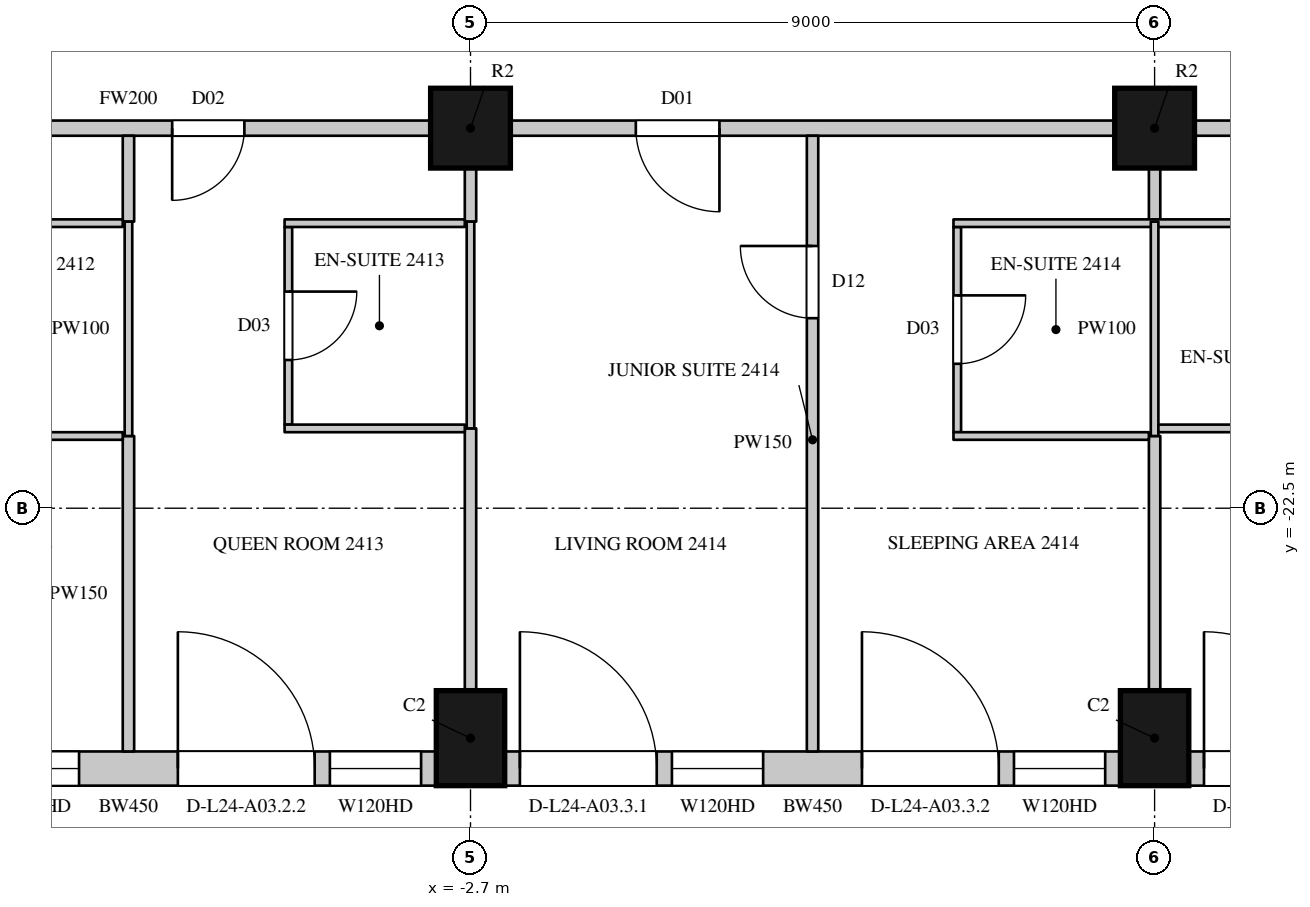
"""IFC4 building model, lengths in metres.
Left out: names, types, materials, properties, quantities, classifications, styles, units other than length and angle.
Written with IfcOpenShell. Run it as: python <this file> out.ifc"""

import sys

from ifc_helpers import new_model, si_unit, direction, frame, frame_2d, origin, origin_2d, place, context, subcontext, project, spatial, rectangle, circle, extrude, element, fill, save


model = new_model("IFC4")
c1 = context("Model", 3, precision=1e-05, world=origin(), true_north=direction((0.0, 1.0)))
c2 = subcontext(c1, "Body", "Model", "MODEL_VIEW")
j1 = project(units=[si_unit("LENGTHUNIT", "METRE"), si_unit("PLANEANGLEUNIT", "RADIAN")], contexts=[c1])
p1 = place(None, origin())
s1 = spatial("IfcSite", under=j1, at=p1, CompositionType="ELEMENT")
p2 = place(p1, origin())
s2 = spatial("IfcBuilding", under=s1, at=p2, CompositionType="ELEMENT")
p3 = place(p2, frame((0.0, 0.0, 116.7)))
s3 = spatial("IfcBuildingStorey", under=s2, at=p3, CompositionType="ELEMENT", Elevation=116.7)
for number, where, z_axis, x_axis in (
    (1, (-2.7, -25.525, 0.0), (0.0, 0.0, 1.0), (1.0, 0.0, 0.0)),
    (2, (6.3, -25.525, 0.0), (0.0, 0.0, 1.0), (1.0, 0.0, 0.0)),
):
    element("IfcColumn", number, at=place(p3, frame(where, z_axis=z_axis, x_axis=x_axis)), inside=s3, PredefinedType="COLUMN", context=c2, shape_type="SweptSolid", body=[
        extrude(rectangle(XDim=0.9, YDim=1.25, at=origin_2d()), origin(), (0.0, 0.0, 1.0), 3.6),
    ])
for number, where, z_axis, x_axis in (
    (3, (-2.7, -17.5, 0.0), (0.0, 0.0, 1.0), (1.0, 0.0, 0.0)),
    (4, (6.3, -17.5, 0.0), (0.0, 0.0, 1.0), (1.0, 0.0, 0.0)),
):
    element("IfcColumn", number, at=place(p3, frame(where, z_axis=z_axis, x_axis=x_axis)), inside=s3, PredefinedType="COLUMN", context=c2, shape_type="SweptSolid", body=[
        extrude(circle(Radius=0.525, at=origin_2d()), origin(), (0.0, 0.0, 1.0), 3.6),
    ])
p4 = place(p3, frame((-11.25, -25.925, 0.0), z_axis=(0.0, 0.0, 1.0), x_axis=(1.0, 0.0, 0.0)))
e5 = element("IfcWall", 5, at=p4, inside=s3, PredefinedType="SOLIDWALL", context=c2, shape_type="SweptSolid", body=[
    extrude(rectangle(XDim=8.1, YDim=0.45, at=frame_2d((4.05, 0.0))), origin(), (0.0, 0.0, 1.0), 3.3),
])
p5 = place(p4, frame((0.2, 0.0, 0.0)))
e6 = element("IfcOpeningElement", 6, at=p5, cuts=e5, PredefinedType="OPENING", context=c2, shape_type="SweptSolid", body=[
    extrude(rectangle(XDim=1.8, YDim=2.4, at=frame_2d((0.9, 1.2))), frame((0.0, 0.235, 0.0), z_axis=(0.0, -1.0, 0.0), x_axis=(1.0, 0.0, 0.0)), (0.0, 0.0, 1.0), 0.47),
])
p6 = place(p4, frame((2.2, 0.0, 1.05)))
e7 = element("IfcOpeningElement", 7, at=p6, cuts=e5, PredefinedType="OPENING", context=c2, shape_type="SweptSolid", body=[
    extrude(rectangle(XDim=1.2, YDim=2.0, at=frame_2d((0.6, 1.0))), frame((0.0, 0.235, 0.0), z_axis=(0.0, -1.0, 0.0), x_axis=(1.0, 0.0, 0.0)), (0.0, 0.0, 1.0), 0.47),
])
p7 = place(p4, frame((4.7, 0.0, 0.0)))
e8 = element("IfcOpeningElement", 8, at=p7, cuts=e5, PredefinedType="OPENING", context=c2, shape_type="SweptSolid", body=[
    extrude(rectangle(XDim=1.8, YDim=2.4, at=frame_2d((0.9, 1.2))), frame((0.0, 0.235, 0.0), z_axis=(0.0, -1.0, 0.0), x_axis=(1.0, 0.0, 0.0)), (0.0, 0.0, 1.0), 0.47),
])
p8 = place(p4, frame((6.7, 0.0, 1.05)))
e9 = element("IfcOpeningElement", 9, at=p8, cuts=e5, PredefinedType="OPENING", context=c2, shape_type="SweptSolid", body=[
    extrude(rectangle(XDim=1.2, YDim=2.0, at=frame_2d((0.6, 1.0))), frame((0.0, 0.235, 0.0), z_axis=(0.0, -1.0, 0.0), x_axis=(1.0, 0.0, 0.0)), (0.0, 0.0, 1.0), 0.47),
])
p9 = place(p3, frame((-2.25, -25.925, 0.0), z_axis=(0.0, 0.0, 1.0), x_axis=(1.0, 0.0, 0.0)))
e10 = element("IfcWall", 10, at=p9, inside=s3, PredefinedType="SOLIDWALL", context=c2, shape_type="SweptSolid", body=[
    extrude(rectangle(XDim=8.1, YDim=0.45, at=frame_2d((4.05, 0.0))), origin(), (0.0, 0.0, 1.0), 3.3),
])
p10 = place(p9, frame((0.2, 0.0, 0.0)))
e11 = element("IfcOpeningElement", 11, at=p10, cuts=e10, PredefinedType="OPENING", context=c2, shape_type="SweptSolid", body=[
    extrude(rectangle(XDim=1.8, YDim=2.4, at=frame_2d((0.9, 1.2))), frame((0.0, 0.235, 0.0), z_axis=(0.0, -1.0, 0.0), x_axis=(1.0, 0.0, 0.0)), (0.0, 0.0, 1.0), 0.47),
])
p11 = place(p9, frame((2.2, 0.0, 1.05)))
e12 = element("IfcOpeningElement", 12, at=p11, cuts=e10, PredefinedType="OPENING", context=c2, shape_type="SweptSolid", body=[
    extrude(rectangle(XDim=1.2, YDim=2.0, at=frame_2d((0.6, 1.0))), frame((0.0, 0.235, 0.0), z_axis=(0.0, -1.0, 0.0), x_axis=(1.0, 0.0, 0.0)), (0.0, 0.0, 1.0), 0.47),
])
p12 = place(p9, frame((4.7, 0.0, 0.0)))
e13 = element("IfcOpeningElement", 13, at=p12, cuts=e10, PredefinedType="OPENING", context=c2, shape_type="SweptSolid", body=[
    extrude(rectangle(XDim=1.8, YDim=2.4, at=frame_2d((0.9, 1.2))), frame((0.0, 0.235, 0.0), z_axis=(0.0, -1.0, 0.0), x_axis=(1.0, 0.0, 0.0)), (0.0, 0.0, 1.0), 0.47),
])
p13 = place(p9, frame((6.7, 0.0, 1.05)))
e14 = element("IfcOpeningElement", 14, at=p13, cuts=e10, PredefinedType="OPENING", context=c2, shape_type="SweptSolid", body=[
    extrude(rectangle(XDim=1.2, YDim=2.0, at=frame_2d((0.6, 1.0))), frame((0.0, 0.235, 0.0), z_axis=(0.0, -1.0, 0.0), x_axis=(1.0, 0.0, 0.0)), (0.0, 0.0, 1.0), 0.47),
])
p14 = place(p3, frame((6.75, -25.925, 0.0), z_axis=(0.0, 0.0, 1.0), x_axis=(1.0, 0.0, 0.0)))
e15 = element("IfcWall", 15, at=p14, inside=s3, PredefinedType="SOLIDWALL", context=c2, shape_type="SweptSolid", body=[
    extrude(rectangle(XDim=8.1, YDim=0.45, at=frame_2d((4.05, 0.0))), origin(), (0.0, 0.0, 1.0), 3.3),
])
p15 = place(p14, frame((0.2, 0.0, 0.0)))
e16 = element("IfcOpeningElement", 16, at=p15, cuts=e15, PredefinedType="OPENING", context=c2, shape_type="SweptSolid", body=[
    extrude(rectangle(XDim=1.8, YDim=2.4, at=frame_2d((0.9, 1.2))), frame((0.0, 0.235, 0.0), z_axis=(0.0, -1.0, 0.0), x_axis=(1.0, 0.0, 0.0)), (0.0, 0.0, 1.0), 0.47),
])
p16 = place(p14, frame((2.2, 0.0, 1.05)))
e17 = element("IfcOpeningElement", 17, at=p16, cuts=e15, PredefinedType="OPENING", context=c2, shape_type="SweptSolid", body=[
    extrude(rectangle(XDim=1.2, YDim=2.0, at=frame_2d((0.6, 1.0))), frame((0.0, 0.235, 0.0), z_axis=(0.0, -1.0, 0.0), x_axis=(1.0, 0.0, 0.0)), (0.0, 0.0, 1.0), 0.47),
])
p17 = place(p14, frame((5.4, 0.0, 0.0)))
e18 = element("IfcOpeningElement", 18, at=p17, cuts=e15, PredefinedType="OPENING", context=c2, shape_type="SweptSolid", body=[
    extrude(rectangle(XDim=1.8, YDim=2.4, at=frame_2d((0.9, 1.2))), frame((0.0, 0.235, 0.0), z_axis=(0.0, -1.0, 0.0), x_axis=(1.0, 0.0, 0.0)), (0.0, 0.0, 1.0), 0.47),
])
p18 = place(p3, frame((-11.175, -17.5, 0.0), z_axis=(0.0, 0.0, 1.0), x_axis=(1.0, 0.0, 0.0)))
e19 = element("IfcWall", 19, at=p18, inside=s3, PredefinedType="PARTITIONING", context=c2, shape_type="SweptSolid", body=[
    extrude(rectangle(XDim=7.95, YDim=0.2, at=frame_2d((3.975, 0.0))), origin(), (0.0, 0.0, 1.0), 2.75),
])
p19 = place(p18, frame((4.55, 0.0, 0.0)))
e20 = element("IfcOpeningElement", 20, at=p19, cuts=e19, PredefinedType="OPENING", context=c2, shape_type="SweptSolid", body=[
    extrude(rectangle(XDim=0.95, YDim=2.2, at=frame_2d((0.475, 1.1))), frame((0.0, 0.11, 0.0), z_axis=(0.0, -1.0, 0.0), x_axis=(1.0, 0.0, 0.0)), (0.0, 0.0, 1.0), 0.22),
])
p20 = place(p3, frame((-2.175, -17.5, 0.0), z_axis=(0.0, 0.0, 1.0), x_axis=(1.0, 0.0, 0.0)))
e21 = element("IfcWall", 21, at=p20, inside=s3, PredefinedType="PARTITIONING", context=c2, shape_type="SweptSolid", body=[
    extrude(rectangle(XDim=7.95, YDim=0.2, at=frame_2d((3.975, 0.0))), origin(), (0.0, 0.0, 1.0), 2.75),
])
p21 = place(p20, frame((1.65, 0.0, 0.0)))
e22 = element("IfcOpeningElement", 22, at=p21, cuts=e21, PredefinedType="OPENING", context=c2, shape_type="SweptSolid", body=[
    extrude(rectangle(XDim=1.1, YDim=2.4, at=frame_2d((0.55, 1.2))), frame((0.0, 0.11, 0.0), z_axis=(0.0, -1.0, 0.0), x_axis=(1.0, 0.0, 0.0)), (0.0, 0.0, 1.0), 0.22),
])
p22 = place(p3, frame((6.825, -17.5, 0.0), z_axis=(0.0, 0.0, 1.0), x_axis=(1.0, 0.0, 0.0)))
e23 = element("IfcWall", 23, at=p22, inside=s3, PredefinedType="PARTITIONING", context=c2, shape_type="SweptSolid", body=[
    extrude(rectangle(XDim=7.95, YDim=0.2, at=frame_2d((3.975, 0.0))), origin(), (0.0, 0.0, 1.0), 2.75),
])
p23 = place(p22, frame((2.45, 0.0, 0.0)))
e24 = element("IfcOpeningElement", 24, at=p23, cuts=e23, PredefinedType="OPENING", context=c2, shape_type="SweptSolid", body=[
    extrude(rectangle(XDim=0.95, YDim=2.2, at=frame_2d((0.475, 1.1))), frame((0.0, 0.11, 0.0), z_axis=(0.0, -1.0, 0.0), x_axis=(1.0, 0.0, 0.0)), (0.0, 0.0, 1.0), 0.22),
])
p24 = place(p22, frame((4.95, 0.0, 0.0)))
e25 = element("IfcOpeningElement", 25, at=p24, cuts=e23, PredefinedType="OPENING", context=c2, shape_type="SweptSolid", body=[
    extrude(rectangle(XDim=0.95, YDim=2.2, at=frame_2d((0.475, 1.1))), frame((0.0, 0.11, 0.0), z_axis=(0.0, -1.0, 0.0), x_axis=(1.0, 0.0, 0.0)), (0.0, 0.0, 1.0), 0.22),
])
p25 = place(p3, frame((-7.2, -25.7, 0.0), z_axis=(0.0, 0.0, 1.0), x_axis=(0.0, 1.0, 0.0)))
e26 = element("IfcWall", 26, at=p25, inside=s3, PredefinedType="PARTITIONING", context=c2, shape_type="SweptSolid", body=[
    extrude(rectangle(XDim=4.15, YDim=0.15, at=frame_2d((2.075, 0.0))), origin(), (0.0, 0.0, 1.0), 2.65),
])
p26 = place(p3, frame((-7.2, -18.73, 0.0), z_axis=(0.0, 0.0, 1.0), x_axis=(0.0, 1.0, 0.0)))
e27 = element("IfcWall", 27, at=p26, inside=s3, PredefinedType="PARTITIONING", context=c2, shape_type="SweptSolid", body=[
    extrude(rectangle(XDim=1.13, YDim=0.15, at=frame_2d((0.565, 0.0))), origin(), (0.0, 0.0, 1.0), 2.65),
])
p27 = place(p3, frame((-2.7, -24.9, 0.0), z_axis=(0.0, 0.0, 1.0), x_axis=(0.0, 1.0, 0.0)))
e28 = element("IfcWall", 28, at=p27, inside=s3, PredefinedType="PARTITIONING", context=c2, shape_type="SweptSolid", body=[
    extrude(rectangle(XDim=3.45, YDim=0.15, at=frame_2d((1.725, 0.0))), origin(), (0.0, 0.0, 1.0), 2.75),
])
p28 = place(p3, frame((-2.7, -18.73, 0.0), z_axis=(0.0, 0.0, 1.0), x_axis=(0.0, 1.0, 0.0)))
e29 = element("IfcWall", 29, at=p28, inside=s3, PredefinedType="PARTITIONING", context=c2, shape_type="SweptSolid", body=[
    extrude(rectangle(XDim=0.705, YDim=0.15, at=frame_2d((0.353, 0.0))), origin(), (0.0, 0.0, 1.0), 2.75),
])
p29 = place(p3, frame((1.8, -25.7, 0.0), z_axis=(0.0, 0.0, 1.0), x_axis=(0.0, 1.0, 0.0)))
e30 = element("IfcWall", 30, at=p29, inside=s3, PredefinedType="PARTITIONING", context=c2, shape_type="SweptSolid", body=[
    extrude(rectangle(XDim=8.1, YDim=0.15, at=frame_2d((4.05, 0.0))), origin(), (0.0, 0.0, 1.0), 2.65),
])
p30 = place(p29, frame((5.7, 0.0, 0.0)))
e31 = element("IfcOpeningElement", 31, at=p30, cuts=e30, PredefinedType="OPENING", context=c2, shape_type="SweptSolid", body=[
    extrude(rectangle(XDim=0.95, YDim=2.2, at=frame_2d((0.475, 1.1))), frame((0.0, 0.085, 0.0), z_axis=(0.0, -1.0, 0.0), x_axis=(1.0, 0.0, 0.0)), (0.0, 0.0, 1.0), 0.17),
])
p31 = place(p3, frame((6.3, -24.9, 0.0), z_axis=(0.0, 0.0, 1.0), x_axis=(0.0, 1.0, 0.0)))
e32 = element("IfcWall", 32, at=p31, inside=s3, PredefinedType="PARTITIONING", context=c2, shape_type="SweptSolid", body=[
    extrude(rectangle(XDim=3.35, YDim=0.15, at=frame_2d((1.675, 0.0))), origin(), (0.0, 0.0, 1.0), 2.75),
])
p32 = place(p3, frame((6.3, -18.73, 0.0), z_axis=(0.0, 0.0, 1.0), x_axis=(0.0, 1.0, 0.0)))
e33 = element("IfcWall", 33, at=p32, inside=s3, PredefinedType="PARTITIONING", context=c2, shape_type="SweptSolid", body=[
    extrude(rectangle(XDim=0.705, YDim=0.15, at=frame_2d((0.353, 0.0))), origin(), (0.0, 0.0, 1.0), 2.75),
])
for number, where, z_axis, x_axis in (
    (34, (-9.846, -21.55, 0.0), (0.0, 0.0, 1.0), (1.0, 0.0, 0.0)),
    (35, (-9.846, -18.75, 0.0), (0.0, 0.0, 1.0), (1.0, 0.0, 0.0)),
):
    element("IfcWall", number, at=place(p3, frame(where, z_axis=z_axis, x_axis=x_axis)), inside=s3, PredefinedType="PARTITIONING", context=c2, shape_type="SweptSolid", body=[
        extrude(rectangle(XDim=2.571, YDim=0.1, at=frame_2d((1.286, 0.0))), origin(), (0.0, 0.0, 1.0), 3.3),
    ])
p33 = place(p3, frame((-7.2, -21.55, 0.0), z_axis=(0.0, 0.0, 1.0), x_axis=(0.0, 1.0, 0.0)))
e36 = element("IfcWall", 36, at=p33, inside=s3, PredefinedType="PARTITIONING", context=c2, shape_type="SweptSolid", body=[
    extrude(rectangle(XDim=2.82, YDim=0.1, at=frame_2d((1.41, 0.0))), origin(), (0.0, 0.0, 1.0), 2.65),
])
p34 = place(p3, frame((-5.096, -21.4, 0.0), z_axis=(0.0, 0.0, 1.0), x_axis=(0.0, 1.0, 0.0)))
e37 = element("IfcWall", 37, at=p34, inside=s3, PredefinedType="PARTITIONING", context=c2, shape_type="SweptSolid", body=[
    extrude(rectangle(XDim=2.6, YDim=0.1, at=frame_2d((1.3, 0.0))), origin(), (0.0, 0.0, 1.0), 3.3),
])
p35 = place(p34, frame((0.85, 0.0, 0.0)))
e38 = element("IfcOpeningElement", 38, at=p35, cuts=e37, PredefinedType="OPENING", context=c2, shape_type="SweptSolid", body=[
    extrude(rectangle(XDim=0.9, YDim=2.2, at=frame_2d((0.45, 1.1))), frame((0.0, 0.06, 0.0), z_axis=(0.0, -1.0, 0.0), x_axis=(1.0, 0.0, 0.0)), (0.0, 0.0, 1.0), 0.12),
])
for number, where, z_axis, x_axis in (
    (39, (-5.146, -21.45, 0.0), (0.0, 0.0, 1.0), (1.0, 0.0, 0.0)),
    (40, (-5.146, -18.75, 0.0), (0.0, 0.0, 1.0), (1.0, 0.0, 0.0)),
):
    element("IfcWall", number, at=place(p3, frame(where, z_axis=z_axis, x_axis=x_axis)), inside=s3, PredefinedType="PARTITIONING", context=c2, shape_type="SweptSolid", body=[
        extrude(rectangle(XDim=2.371, YDim=0.1, at=frame_2d((1.186, 0.0))), origin(), (0.0, 0.0, 1.0), 3.3),
    ])
p36 = place(p3, frame((-2.7, -21.45, 0.0), z_axis=(0.0, 0.0, 1.0), x_axis=(0.0, 1.0, 0.0)))
e41 = element("IfcWall", 41, at=p36, inside=s3, PredefinedType="PARTITIONING", context=c2, shape_type="SweptSolid", body=[
    extrude(rectangle(XDim=2.72, YDim=0.1, at=frame_2d((1.36, 0.0))), origin(), (0.0, 0.0, 1.0), 2.75),
])
p37 = place(p3, frame((3.704, -21.5, 0.0), z_axis=(0.0, 0.0, 1.0), x_axis=(0.0, 1.0, 0.0)))
e42 = element("IfcWall", 42, at=p37, inside=s3, PredefinedType="PARTITIONING", context=c2, shape_type="SweptSolid", body=[
    extrude(rectangle(XDim=2.7, YDim=0.1, at=frame_2d((1.35, 0.0))), origin(), (0.0, 0.0, 1.0), 3.3),
])
p38 = place(p37, frame((0.9, 0.0, 0.0)))
e43 = element("IfcOpeningElement", 43, at=p38, cuts=e42, PredefinedType="OPENING", context=c2, shape_type="SweptSolid", body=[
    extrude(rectangle(XDim=0.9, YDim=2.2, at=frame_2d((0.45, 1.1))), frame((0.0, 0.06, 0.0), z_axis=(0.0, -1.0, 0.0), x_axis=(1.0, 0.0, 0.0)), (0.0, 0.0, 1.0), 0.12),
])
p39 = place(p3, frame((3.654, -21.55, 0.0), z_axis=(0.0, 0.0, 1.0), x_axis=(1.0, 0.0, 0.0)))
e44 = element("IfcWall", 44, at=p39, inside=s3, PredefinedType="PARTITIONING", context=c2, shape_type="SweptSolid", body=[
    extrude(rectangle(XDim=2.571, YDim=0.1, at=frame_2d((1.286, 0.0))), origin(), (0.0, 0.0, 1.0), 3.3),
])
p40 = place(p3, frame((3.654, -18.75, 0.0), z_axis=(0.0, 0.0, 1.0), x_axis=(1.0, 0.0, 0.0)))
e45 = element("IfcWall", 45, at=p40, inside=s3, PredefinedType="PARTITIONING", context=c2, shape_type="SweptSolid", body=[
    extrude(rectangle(XDim=5.092, YDim=0.1, at=frame_2d((2.546, 0.0))), origin(), (0.0, 0.0, 1.0), 3.3),
])
p41 = place(p40, frame((3.95, 0.0, 0.0)))
e46 = element("IfcOpeningElement", 46, at=p41, cuts=e45, PredefinedType="OPENING", context=c2, shape_type="SweptSolid", body=[
    extrude(rectangle(XDim=0.9, YDim=2.2, at=frame_2d((0.45, 1.1))), frame((0.0, 0.06, 0.0), z_axis=(0.0, -1.0, 0.0), x_axis=(1.0, 0.0, 0.0)), (0.0, 0.0, 1.0), 0.12),
])
p42 = place(p3, frame((6.3, -21.55, 0.0), z_axis=(0.0, 0.0, 1.0), x_axis=(0.0, 1.0, 0.0)))
e47 = element("IfcWall", 47, at=p42, inside=s3, PredefinedType="PARTITIONING", context=c2, shape_type="SweptSolid", body=[
    extrude(rectangle(XDim=2.82, YDim=0.1, at=frame_2d((1.41, 0.0))), origin(), (0.0, 0.0, 1.0), 2.75),
])
p43 = place(p3, frame((6.35, -21.45, 0.0), z_axis=(0.0, 0.0, 1.0), x_axis=(1.0, 0.0, 0.0)))
e48 = element("IfcWall", 48, at=p43, inside=s3, PredefinedType="PARTITIONING", context=c2, shape_type="SweptSolid", body=[
    extrude(rectangle(XDim=2.396, YDim=0.1, at=frame_2d((1.198, 0.0))), origin(), (0.0, 0.0, 1.0), 3.3),
])
p44 = place(p6, origin())
e49 = element("IfcWindow", 49, at=p44, inside=s3, PartitioningType="SINGLE_PANEL", PredefinedType="WINDOW", context=c2, shape_type="SweptSolid", body=[
    extrude(rectangle(XDim=1.2, YDim=2.0, at=frame_2d((0.6, 1.0))), frame((0.0, 0.135, 0.0), z_axis=(0.0, -1.0, 0.0), x_axis=(1.0, 0.0, 0.0)), (0.0, 0.0, 1.0), 0.06),
])
fill(e7, e49)
p45 = place(p7, origin())
e50 = element("IfcDoor", 50, at=p45, inside=s3, OperationType="SLIDING_TO_LEFT", PredefinedType="DOOR", context=c2, shape_type="SweptSolid", body=[
    extrude(rectangle(XDim=1.8, YDim=2.4, at=frame_2d((0.9, 1.2))), frame((0.0, 0.13, 0.0), z_axis=(0.0, -1.0, 0.0), x_axis=(1.0, 0.0, 0.0)), (0.0, 0.0, 1.0), 0.05),
])
fill(e8, e50)
p46 = place(p8, origin())
e51 = element("IfcWindow", 51, at=p46, inside=s3, PartitioningType="SINGLE_PANEL", PredefinedType="WINDOW", context=c2, shape_type="SweptSolid", body=[
    extrude(rectangle(XDim=1.2, YDim=2.0, at=frame_2d((0.6, 1.0))), frame((0.0, 0.135, 0.0), z_axis=(0.0, -1.0, 0.0), x_axis=(1.0, 0.0, 0.0)), (0.0, 0.0, 1.0), 0.06),
])
fill(e9, e51)
p47 = place(p10, origin())
e52 = element("IfcDoor", 52, at=p47, inside=s3, OperationType="SLIDING_TO_LEFT", PredefinedType="DOOR", context=c2, shape_type="SweptSolid", body=[
    extrude(rectangle(XDim=1.8, YDim=2.4, at=frame_2d((0.9, 1.2))), frame((0.0, 0.13, 0.0), z_axis=(0.0, -1.0, 0.0), x_axis=(1.0, 0.0, 0.0)), (0.0, 0.0, 1.0), 0.05),
])
fill(e11, e52)
p48 = place(p11, origin())
e53 = element("IfcWindow", 53, at=p48, inside=s3, PartitioningType="SINGLE_PANEL", PredefinedType="WINDOW", context=c2, shape_type="SweptSolid", body=[
    extrude(rectangle(XDim=1.2, YDim=2.0, at=frame_2d((0.6, 1.0))), frame((0.0, 0.135, 0.0), z_axis=(0.0, -1.0, 0.0), x_axis=(1.0, 0.0, 0.0)), (0.0, 0.0, 1.0), 0.06),
])
fill(e12, e53)
p49 = place(p12, origin())
e54 = element("IfcDoor", 54, at=p49, inside=s3, OperationType="SLIDING_TO_LEFT", PredefinedType="DOOR", context=c2, shape_type="SweptSolid", body=[
    extrude(rectangle(XDim=1.8, YDim=2.4, at=frame_2d((0.9, 1.2))), frame((0.0, 0.13, 0.0), z_axis=(0.0, -1.0, 0.0), x_axis=(1.0, 0.0, 0.0)), (0.0, 0.0, 1.0), 0.05),
])
fill(e13, e54)
p50 = place(p13, origin())
e55 = element("IfcWindow", 55, at=p50, inside=s3, PartitioningType="SINGLE_PANEL", PredefinedType="WINDOW", context=c2, shape_type="SweptSolid", body=[
    extrude(rectangle(XDim=1.2, YDim=2.0, at=frame_2d((0.6, 1.0))), frame((0.0, 0.135, 0.0), z_axis=(0.0, -1.0, 0.0), x_axis=(1.0, 0.0, 0.0)), (0.0, 0.0, 1.0), 0.06),
])
fill(e14, e55)
p51 = place(p15, origin())
e56 = element("IfcDoor", 56, at=p51, inside=s3, OperationType="SLIDING_TO_LEFT", PredefinedType="DOOR", context=c2, shape_type="SweptSolid", body=[
    extrude(rectangle(XDim=1.8, YDim=2.4, at=frame_2d((0.9, 1.2))), frame((0.0, 0.13, 0.0), z_axis=(0.0, -1.0, 0.0), x_axis=(1.0, 0.0, 0.0)), (0.0, 0.0, 1.0), 0.05),
])
fill(e16, e56)
p52 = place(p19, origin())
e57 = element("IfcDoor", 57, at=p52, inside=s3, OperationType="SINGLE_SWING_RIGHT", PredefinedType="DOOR", context=c2, shape_type="SweptSolid", body=[
    extrude(rectangle(XDim=0.95, YDim=2.2, at=frame_2d((0.475, 1.1))), frame((0.0, 0.025, 0.0), z_axis=(0.0, -1.0, 0.0), x_axis=(1.0, 0.0, 0.0)), (0.0, 0.0, 1.0), 0.05),
])
fill(e20, e57)
p53 = place(p35, origin())
e58 = element("IfcDoor", 58, at=p53, inside=s3, OperationType="SINGLE_SWING_LEFT", PredefinedType="DOOR", context=c2, shape_type="SweptSolid", body=[
    extrude(rectangle(XDim=0.9, YDim=2.2, at=frame_2d((0.45, 1.1))), frame((0.0, 0.025, 0.0), z_axis=(0.0, -1.0, 0.0), x_axis=(1.0, 0.0, 0.0)), (0.0, 0.0, 1.0), 0.05),
])
fill(e38, e58)
p54 = place(p21, origin())
e59 = element("IfcDoor", 59, at=p54, inside=s3, OperationType="SINGLE_SWING_LEFT", PredefinedType="DOOR", context=c2, shape_type="SweptSolid", body=[
    extrude(rectangle(XDim=1.1, YDim=2.4, at=frame_2d((0.55, 1.2))), frame((0.0, 0.025, 0.0), z_axis=(0.0, -1.0, 0.0), x_axis=(1.0, 0.0, 0.0)), (0.0, 0.0, 1.0), 0.05),
])
fill(e22, e59)
p55 = place(p30, origin())
e60 = element("IfcDoor", 60, at=p55, inside=s3, OperationType="SINGLE_SWING_RIGHT", PredefinedType="DOOR", context=c2, shape_type="SweptSolid", body=[
    extrude(rectangle(XDim=0.95, YDim=2.2, at=frame_2d((0.475, 1.1))), frame((0.0, 0.025, 0.0), z_axis=(0.0, -1.0, 0.0), x_axis=(1.0, 0.0, 0.0)), (0.0, 0.0, 1.0), 0.05),
])
fill(e31, e60)
p56 = place(p38, origin())
e61 = element("IfcDoor", 61, at=p56, inside=s3, OperationType="SINGLE_SWING_LEFT", PredefinedType="DOOR", context=c2, shape_type="SweptSolid", body=[
    extrude(rectangle(XDim=0.9, YDim=2.2, at=frame_2d((0.45, 1.1))), frame((0.0, 0.025, 0.0), z_axis=(0.0, -1.0, 0.0), x_axis=(1.0, 0.0, 0.0)), (0.0, 0.0, 1.0), 0.05),
])
fill(e43, e61)
save(model, sys.argv[1])
